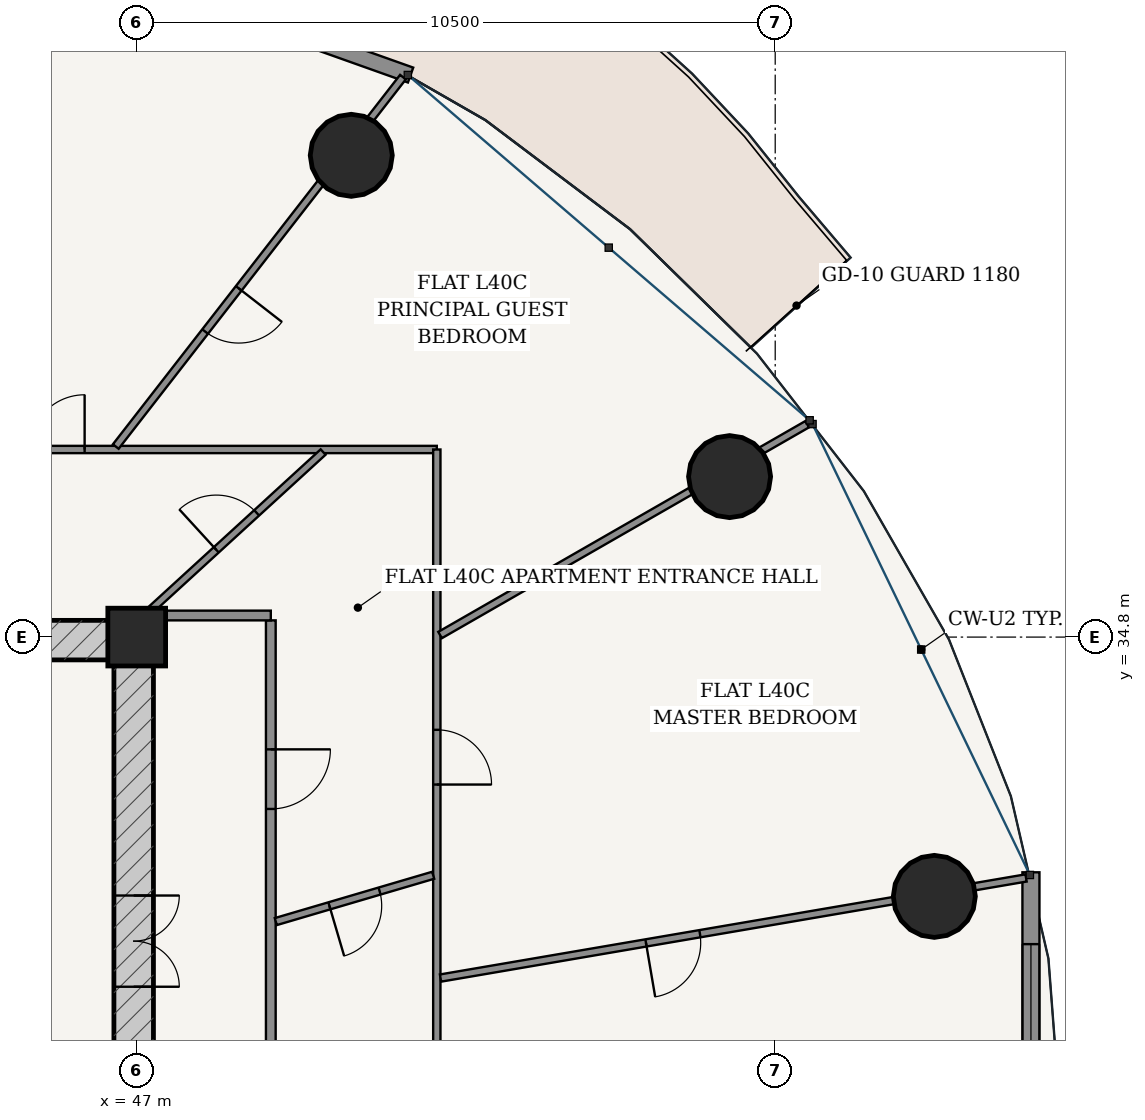
"""IFC4 building model, lengths in metres.
Left out: names, types, materials, properties, quantities, classifications, styles, units other than length and angle.
Written with IfcOpenShell. Run it as: python <this file> out.ifc"""

import sys

from ifc_helpers import new_model, si_unit, direction, frame, frame_2d, origin, origin_2d, place, context, subcontext, project, spatial, rectangle, hollow_circle, extrude, source, transform, mapped, element, fill, save


model = new_model("IFC4")
c1 = context("Model", 3, precision=1e-05, world=origin(), true_north=direction((-0.2419218956, 0.970295726276)))
c2 = subcontext(c1, "Body", "Model", "MODEL_VIEW")
j1 = project(units=[si_unit("LENGTHUNIT", "METRE"), si_unit("PLANEANGLEUNIT", "RADIAN")], contexts=[c1])
p1 = place(None, origin())
s1 = spatial("IfcSite", under=j1, at=p1, CompositionType="ELEMENT")
p2 = place(p1, origin())
s2 = spatial("IfcBuilding", under=s1, at=p2, CompositionType="ELEMENT")
p3 = place(p2, frame((0.0, 0.0, 153.4)))
s3 = spatial("IfcBuildingStorey", under=s2, at=p3, CompositionType="ELEMENT", Elevation=153.4)
p4 = place(p3, frame((47.0, 34.8, 0.0), z_axis=(0.0, 0.0, 1.0), x_axis=(1.0, 0.0, 0.0)))
e1 = element("IfcColumn", 1, at=p4, inside=s3, PredefinedType="COLUMN", context=c2, shape_type="SweptSolid", body=[
    extrude(rectangle(XDim=0.95, YDim=0.95, at=origin_2d()), origin(), (0.0, 0.0, 1.0), 3.6),
])
p5 = place(p3, frame((28.725, 34.75, 0.0), z_axis=(0.0, 0.0, 1.0), x_axis=(1.0, 0.0, 0.0)))
e2 = element("IfcWall", 2, at=p5, inside=s3, PredefinedType="SHEAR", context=c2, shape_type="SweptSolid", body=[
    extrude(rectangle(XDim=18.55, YDim=0.65, at=frame_2d((9.275, 0.0))), origin(), (0.0, 0.0, 1.0), 3.33),
])
p6 = place(p3, frame((46.95, 19.175, 0.0), z_axis=(0.0, 0.0, 1.0), x_axis=(0.0, 1.0, 0.0)))
e3 = element("IfcWall", 3, at=p6, inside=s3, PredefinedType="SHEAR", context=c2, shape_type="SweptSolid", body=[
    extrude(rectangle(XDim=15.25, YDim=0.65, at=frame_2d((7.625, 0.0))), origin(), (0.0, 0.0, 1.0), 3.33),
])
p7 = place(p6, frame((9.875, 0.0, 0.0)))
e4 = element("IfcOpeningElement", 4, at=p7, cuts=e3, PredefinedType="OPENING", context=c2, shape_type="SweptSolid", body=[
    extrude(rectangle(XDim=1.5, YDim=2.2, at=frame_2d((0.75, 1.1))), frame((0.0, 0.335, 0.0), z_axis=(0.0, -1.0, 0.0), x_axis=(1.0, 0.0, 0.0)), (0.0, 0.0, 1.0), 0.67),
])
for number, where, z_axis, x_axis in (
    (5, (60.117, 30.536, 0.0), (0.0, 0.0, 1.0), (1.0, 0.0, 0.0)),
    (6, (56.75, 37.439, 0.0), (0.0, 0.0, 1.0), (1.0, 0.0, 0.0)),
    (7, (50.528, 42.723, 0.0), (0.0, 0.0, 1.0), (1.0, 0.0, 0.0)),
):
    element("IfcColumn", number, at=place(p3, frame(where, z_axis=z_axis, x_axis=x_axis)), inside=s3, PredefinedType="COLUMN", context=c2, shape_type="SweptSolid", body=[
        extrude(hollow_circle(Radius=0.675, WallThickness=0.042, at=origin_2d()), origin(), (0.0, 0.0, 1.0), 3.6),
    ])
p8 = place(p3, frame((51.503, 44.043, 0.0), z_axis=(0.0, 0.0, 1.0), x_axis=(-0.942095406405, 0.335344964522, 0.0)))
e8 = element("IfcWall", 8, at=p8, inside=s3, PredefinedType="SOLIDWALL", context=c2, shape_type="SweptSolid", body=[
    extrude(rectangle(XDim=9.408, YDim=0.26, at=frame_2d((4.704, 0.0))), origin(), (0.0, 0.0, 1.0), 3.33),
])
p9 = place(p8, frame((4.029, 0.0, 0.0)))
e9 = element("IfcOpeningElement", 9, at=p9, cuts=e8, PredefinedType="OPENING", context=c2, shape_type="SweptSolid", body=[
    extrude(rectangle(XDim=1.35, YDim=2.2, at=frame_2d((0.675, 1.1))), frame((0.0, 0.14, 0.0), z_axis=(0.0, -1.0, 0.0), x_axis=(1.0, 0.0, 0.0)), (0.0, 0.0, 1.0), 0.28),
])
p10 = place(p3, frame((61.706, 22.668, 0.0), z_axis=(0.0, 0.0, 1.0), x_axis=(0.0, 1.0, 0.0)))
e10 = element("IfcWall", 10, at=p10, inside=s3, PredefinedType="SOLIDWALL", context=c2, shape_type="SweptSolid", body=[
    extrude(rectangle(XDim=8.264, YDim=0.28, at=frame_2d((4.132, 0.0))), origin(), (0.0, 0.0, 1.0), 3.33),
])
p11 = place(p10, frame((1.181, 0.0, 0.85)))
e11 = element("IfcOpeningElement", 11, at=p11, cuts=e10, PredefinedType="OPENING", context=c2, shape_type="SweptSolid", body=[
    extrude(rectangle(XDim=2.1, YDim=1.95, at=frame_2d((1.05, 0.975))), frame((0.0, 0.15, 0.0), z_axis=(0.0, -1.0, 0.0), x_axis=(1.0, 0.0, 0.0)), (0.0, 0.0, 1.0), 0.3),
])
p12 = place(p10, frame((4.983, 0.0, 0.85)))
e12 = element("IfcOpeningElement", 12, at=p12, cuts=e10, PredefinedType="OPENING", context=c2, shape_type="SweptSolid", body=[
    extrude(rectangle(XDim=2.1, YDim=1.95, at=frame_2d((1.05, 0.975))), frame((0.0, 0.15, 0.0), z_axis=(0.0, -1.0, 0.0), x_axis=(1.0, 0.0, 0.0)), (0.0, 0.0, 1.0), 0.3),
])
p13 = place(p3, frame((49.205, 16.675, 0.0), z_axis=(0.0, 0.0, 1.0), x_axis=(0.0, 1.0, 0.0)))
e13 = element("IfcWall", 13, at=p13, inside=s3, PredefinedType="PARTITIONING", context=c2, shape_type="SweptSolid", body=[
    extrude(rectangle(XDim=18.4, YDim=0.16, at=frame_2d((9.2, 0.0))), origin(), (0.0, 0.0, 1.0), 2.776),
])
p14 = place(p13, frame((15.299, 0.0, 0.0)))
e14 = element("IfcOpeningElement", 14, at=p14, cuts=e13, PredefinedType="OPENING", context=c2, shape_type="SweptSolid", body=[
    extrude(rectangle(XDim=0.98, YDim=2.2, at=frame_2d((0.49, 1.1))), frame((0.0, 0.09, 0.0), z_axis=(0.0, -1.0, 0.0), x_axis=(1.0, 0.0, 0.0)), (0.0, 0.0, 1.0), 0.18),
])
p15 = place(p3, frame((47.275, 35.155, 0.0), z_axis=(0.0, 0.0, 1.0), x_axis=(1.0, 0.0, 0.0)))
e15 = element("IfcWall", 15, at=p15, inside=s3, PredefinedType="PARTITIONING", context=c2, shape_type="SweptSolid", body=[
    extrude(rectangle(XDim=1.93, YDim=0.16, at=frame_2d((0.965, 0.0))), origin(), (0.0, 0.0, 1.0), 2.776),
])
p16 = place(p3, frame((44.465, 37.885, 0.0), z_axis=(0.0, 0.0, 1.0), x_axis=(1.0, 0.0, 0.0)))
e16 = element("IfcWall", 16, at=p16, inside=s3, PredefinedType="PARTITIONING", context=c2, shape_type="SweptSolid", body=[
    extrude(rectangle(XDim=7.47, YDim=0.12, at=frame_2d((3.735, 0.0))), origin(), (0.0, 0.0, 1.0), 2.776),
])
p17 = place(p16, frame((0.778, 0.0, 0.0)))
e17 = element("IfcOpeningElement", 17, at=p17, cuts=e16, PredefinedType="OPENING", context=c2, shape_type="SweptSolid", body=[
    extrude(rectangle(XDim=0.9, YDim=2.15, at=frame_2d((0.45, 1.075))), frame((0.0, 0.07, 0.0), z_axis=(0.0, -1.0, 0.0), x_axis=(1.0, 0.0, 0.0)), (0.0, 0.0, 1.0), 0.14),
])
p18 = place(p3, frame((51.935, 37.885, 0.0), z_axis=(0.0, 0.0, 1.0), x_axis=(0.0, -1.0, 0.0)))
e18 = element("IfcWall", 18, at=p18, inside=s3, PredefinedType="PARTITIONING", context=c2, shape_type="SweptSolid", body=[
    extrude(rectangle(XDim=22.96, YDim=0.12, at=frame_2d((11.48, 0.0))), origin(), (0.0, 0.0, 1.0), 2.776),
])
p19 = place(p18, frame((4.61, 0.0, 0.0)))
e19 = element("IfcOpeningElement", 19, at=p19, cuts=e18, PredefinedType="OPENING", context=c2, shape_type="SweptSolid", body=[
    extrude(rectangle(XDim=0.9, YDim=2.15, at=frame_2d((0.45, 1.075))), frame((0.0, 0.07, 0.0), z_axis=(0.0, -1.0, 0.0), x_axis=(1.0, 0.0, 0.0)), (0.0, 0.0, 1.0), 0.14),
])
p20 = place(p18, frame((19.31, 0.0, 0.0)))
e20 = element("IfcOpeningElement", 20, at=p20, cuts=e18, PredefinedType="OPENING", context=c2, shape_type="SweptSolid", body=[
    extrude(rectangle(XDim=0.86, YDim=2.15, at=frame_2d((0.43, 1.075))), frame((0.0, 0.07, 0.0), z_axis=(0.0, -1.0, 0.0), x_axis=(1.0, 0.0, 0.0)), (0.0, 0.0, 1.0), 0.14),
])
p21 = place(p18, frame((13.341, 0.0, 0.0)))
e21 = element("IfcOpeningElement", 21, at=p21, cuts=e18, PredefinedType="OPENING", context=c2, shape_type="SweptSolid", body=[
    extrude(rectangle(XDim=0.9, YDim=2.15, at=frame_2d((0.45, 1.075))), frame((0.0, 0.07, 0.0), z_axis=(0.0, -1.0, 0.0), x_axis=(1.0, 0.0, 0.0)), (0.0, 0.0, 1.0), 0.14),
])
p22 = place(p3, frame((51.996, 29.193, 0.0), z_axis=(0.0, 0.0, 1.0), x_axis=(0.985698378271, 0.168519159369, 0.0)))
e22 = element("IfcWall", 22, at=p22, inside=s3, PredefinedType="PARTITIONING", context=c2, shape_type="SweptSolid", body=[
    extrude(rectangle(XDim=9.769, YDim=0.12, at=frame_2d((4.884, 0.0))), origin(), (0.0, 0.0, 1.0), 2.776),
])
p23 = place(p22, frame((3.428, 0.0, 0.0)))
e23 = element("IfcOpeningElement", 23, at=p23, cuts=e22, PredefinedType="OPENING", context=c2, shape_type="SweptSolid", body=[
    extrude(rectangle(XDim=0.9, YDim=2.15, at=frame_2d((0.45, 1.075))), frame((0.0, 0.07, 0.0), z_axis=(0.0, -1.0, 0.0), x_axis=(1.0, 0.0, 0.0)), (0.0, 0.0, 1.0), 0.14),
])
p24 = place(p3, frame((51.989, 34.834, 0.0), z_axis=(0.0, 0.0, 1.0), x_axis=(0.86717064002, 0.498011125466, 0.0)))
e24 = element("IfcWall", 24, at=p24, inside=s3, PredefinedType="PARTITIONING", context=c2, shape_type="SweptSolid", body=[
    extrude(rectangle(XDim=6.961, YDim=0.12, at=frame_2d((3.48, 0.0))), origin(), (0.0, 0.0, 1.0), 2.776),
])
p25 = place(p3, frame((46.656, 37.934, 0.0), z_axis=(0.0, 0.0, 1.0), x_axis=(0.613758289074, 0.789493991487, 0.0)))
e25 = element("IfcWall", 25, at=p25, inside=s3, PredefinedType="PARTITIONING", context=c2, shape_type="SweptSolid", body=[
    extrude(rectangle(XDim=7.695, YDim=0.12, at=frame_2d((3.848, 0.0))), origin(), (0.0, 0.0, 1.0), 2.776),
])
p26 = place(p25, frame((2.395, 0.0, 0.0)))
e26 = element("IfcOpeningElement", 26, at=p26, cuts=e25, PredefinedType="OPENING", context=c2, shape_type="SweptSolid", body=[
    extrude(rectangle(XDim=0.9, YDim=2.15, at=frame_2d((0.45, 1.075))), frame((0.0, 0.07, 0.0), z_axis=(0.0, -1.0, 0.0), x_axis=(1.0, 0.0, 0.0)), (0.0, 0.0, 1.0), 0.14),
])
p27 = place(p3, frame((49.287, 30.121, 0.0), z_axis=(0.0, 0.0, 1.0), x_axis=(0.959304970846, 0.282372046969, 0.0)))
e27 = element("IfcWall", 27, at=p27, inside=s3, PredefinedType="PARTITIONING", context=c2, shape_type="SweptSolid", body=[
    extrude(rectangle(XDim=2.698, YDim=0.12, at=frame_2d((1.349, 0.0))), origin(), (0.0, 0.0, 1.0), 3.33),
])
p28 = place(p27, frame((0.919, 0.0, 0.0)))
e28 = element("IfcOpeningElement", 28, at=p28, cuts=e27, PredefinedType="OPENING", context=c2, shape_type="SweptSolid", body=[
    extrude(rectangle(XDim=0.86, YDim=2.15, at=frame_2d((0.43, 1.075))), frame((0.0, 0.07, 0.0), z_axis=(0.0, -1.0, 0.0), x_axis=(1.0, 0.0, 0.0)), (0.0, 0.0, 1.0), 0.14),
])
p29 = place(p3, frame((47.216, 35.235, 0.0), z_axis=(0.0, 0.0, 1.0), x_axis=(0.73766811085, 0.675163504816, 0.0)))
e29 = element("IfcWall", 29, at=p29, inside=s3, PredefinedType="PARTITIONING", context=c2, shape_type="SweptSolid", body=[
    extrude(rectangle(XDim=3.863, YDim=0.12, at=frame_2d((1.932, 0.0))), origin(), (0.0, 0.0, 1.0), 2.776),
])
p30 = place(p29, frame((1.481, 0.0, 0.0)))
e30 = element("IfcOpeningElement", 30, at=p30, cuts=e29, PredefinedType="OPENING", context=c2, shape_type="SweptSolid", body=[
    extrude(rectangle(XDim=0.9, YDim=2.15, at=frame_2d((0.45, 1.075))), frame((0.0, 0.07, 0.0), z_axis=(0.0, -1.0, 0.0), x_axis=(1.0, 0.0, 0.0)), (0.0, 0.0, 1.0), 0.14),
])
m1 = source(origin(), c2, "Body", "SweptSolid", [
    extrude(rectangle(XDim=2.1, YDim=1.95, at=frame_2d((1.05, 0.975))), frame((0.0, 0.03, 0.0), z_axis=(0.0, -1.0, 0.0), x_axis=(1.0, 0.0, 0.0)), (0.0, 0.0, 1.0), 0.06),
])
p31 = place(p12, origin())
e31 = element("IfcWindow", 31, at=p31, inside=s3, PartitioningType="SINGLE_PANEL", PredefinedType="WINDOW", context=c2, shape_type="MappedRepresentation", body=[
    mapped(m1, transform((0.0, 0.0, 0.0), scale=1.0)),
])
fill(e12, e31)
m2 = source(origin(), c2, "Body", "SweptSolid", [
    extrude(rectangle(XDim=1.5, YDim=2.2, at=frame_2d((0.75, 1.1))), frame((0.0, 0.025, 0.0), z_axis=(0.0, -1.0, 0.0), x_axis=(1.0, 0.0, 0.0)), (0.0, 0.0, 1.0), 0.05),
])
p32 = place(p7, frame((1.5, 0.0, 0.0), z_axis=(0.0, 0.0, 1.0), x_axis=(-1.0, 0.0, 0.0)))
e32 = element("IfcDoor", 32, at=p32, inside=s3, OperationType="DOUBLE_DOOR_SINGLE_SWING", PredefinedType="DOOR", context=c2, shape_type="MappedRepresentation", body=[
    mapped(m2, transform((0.0, 0.0, 0.0), scale=1.0)),
])
fill(e4, e32)
m3 = source(origin(), c2, "Body", "SweptSolid", [
    extrude(rectangle(XDim=0.98, YDim=2.2, at=frame_2d((0.49, 1.1))), frame((0.0, 0.025, 0.0), z_axis=(0.0, -1.0, 0.0), x_axis=(1.0, 0.0, 0.0)), (0.0, 0.0, 1.0), 0.05),
])
p33 = place(p14, frame((0.98, 0.0, 0.0), z_axis=(0.0, 0.0, 1.0), x_axis=(-1.0, 0.0, 0.0)))
e33 = element("IfcDoor", 33, at=p33, inside=s3, OperationType="SINGLE_SWING_LEFT", PredefinedType="DOOR", context=c2, shape_type="MappedRepresentation", body=[
    mapped(m3, transform((0.0, 0.0, 0.0), scale=1.0)),
])
fill(e14, e33)
m4 = source(origin(), c2, "Body", "SweptSolid", [
    extrude(rectangle(XDim=0.86, YDim=2.15, at=frame_2d((0.43, 1.075))), frame((0.0, 0.025, 0.0), z_axis=(0.0, -1.0, 0.0), x_axis=(1.0, 0.0, 0.0)), (0.0, 0.0, 1.0), 0.05),
])
p34 = place(p28, frame((0.86, 0.0, 0.0), z_axis=(0.0, 0.0, 1.0), x_axis=(-1.0, 0.0, 0.0)))
e34 = element("IfcDoor", 34, at=p34, inside=s3, OperationType="SINGLE_SWING_RIGHT", PredefinedType="DOOR", context=c2, shape_type="MappedRepresentation", body=[
    mapped(m4, transform((0.0, 0.0, 0.0), scale=1.0)),
])
fill(e28, e34)
m5 = source(origin(), c2, "Body", "SweptSolid", [
    extrude(rectangle(XDim=0.9, YDim=2.15, at=frame_2d((0.45, 1.075))), frame((0.0, 0.025, 0.0), z_axis=(0.0, -1.0, 0.0), x_axis=(1.0, 0.0, 0.0)), (0.0, 0.0, 1.0), 0.05),
])
p35 = place(p30, origin())
e35 = element("IfcDoor", 35, at=p35, inside=s3, OperationType="SINGLE_SWING_LEFT", PredefinedType="DOOR", context=c2, shape_type="MappedRepresentation", body=[
    mapped(m5, transform((0.0, 0.0, 0.0), scale=1.0)),
])
fill(e30, e35)
p36 = place(p17, origin())
e36 = element("IfcDoor", 36, at=p36, inside=s3, OperationType="SINGLE_SWING_RIGHT", PredefinedType="DOOR", context=c2, shape_type="MappedRepresentation", body=[
    mapped(m5, transform((0.0, 0.0, 0.0), scale=1.0)),
])
fill(e17, e36)
p37 = place(p19, origin())
e37 = element("IfcDoor", 37, at=p37, inside=s3, OperationType="SINGLE_SWING_RIGHT", PredefinedType="DOOR", context=c2, shape_type="MappedRepresentation", body=[
    mapped(m5, transform((0.0, 0.0, 0.0), scale=1.0)),
])
fill(e19, e37)
p38 = place(p26, frame((0.9, 0.0, 0.0), z_axis=(0.0, 0.0, 1.0), x_axis=(-1.0, 0.0, 0.0)))
e38 = element("IfcDoor", 38, at=p38, inside=s3, OperationType="SINGLE_SWING_LEFT", PredefinedType="DOOR", context=c2, shape_type="MappedRepresentation", body=[
    mapped(m5, transform((0.0, 0.0, 0.0), scale=1.0)),
])
fill(e26, e38)
p39 = place(p23, frame((0.9, 0.0, 0.0), z_axis=(0.0, 0.0, 1.0), x_axis=(-1.0, 0.0, 0.0)))
e39 = element("IfcDoor", 39, at=p39, inside=s3, OperationType="SINGLE_SWING_RIGHT", PredefinedType="DOOR", context=c2, shape_type="MappedRepresentation", body=[
    mapped(m5, transform((0.0, 0.0, 0.0), scale=1.0)),
])
fill(e23, e39)
save(model, sys.argv[1])
